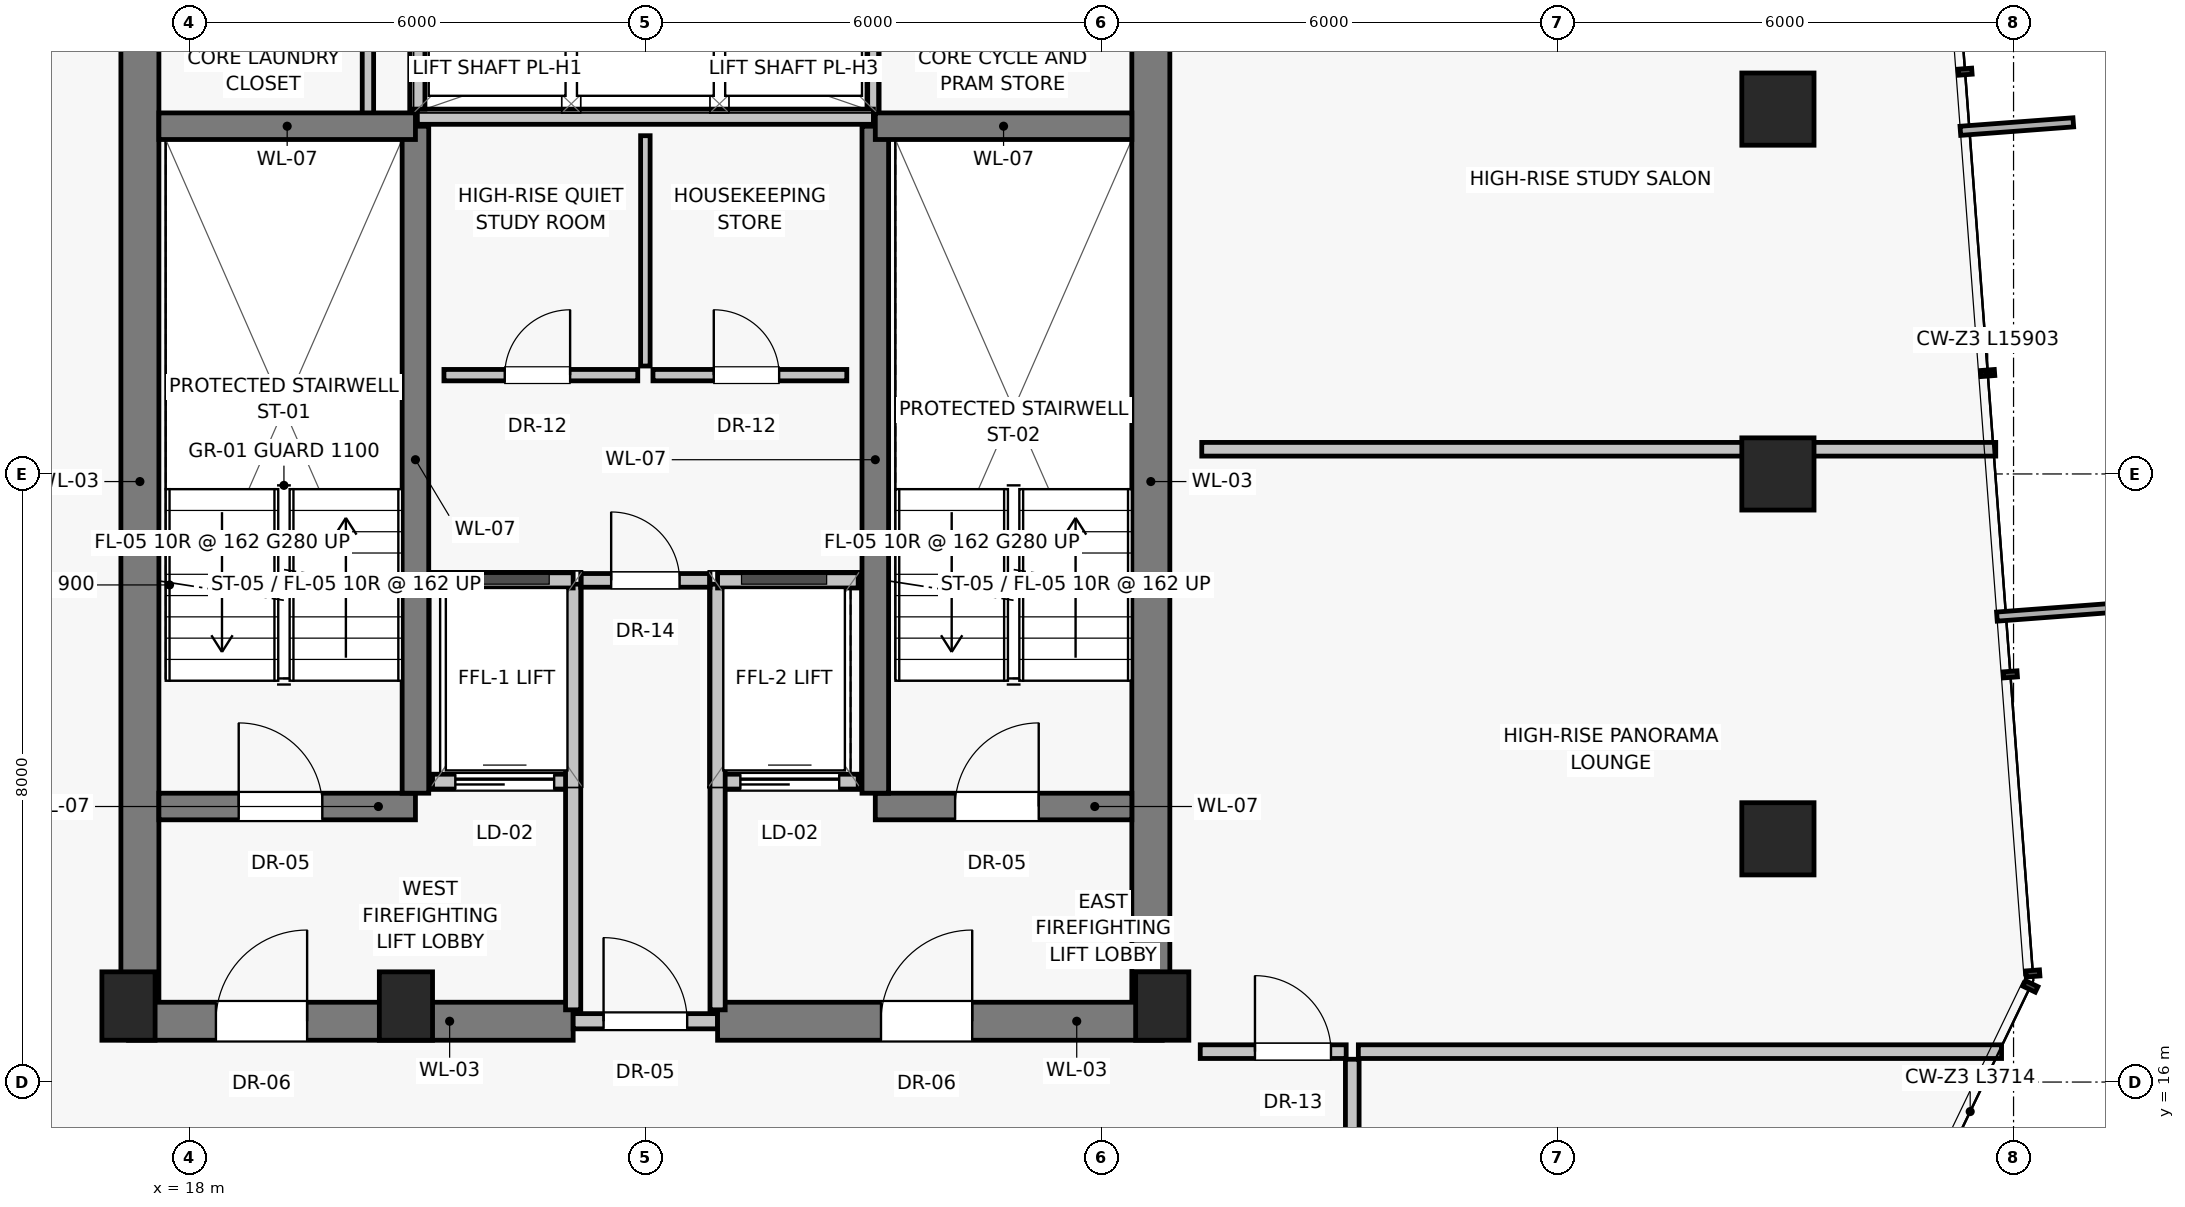
"""IFC4 building model, lengths in metres.
Left out: names, types, materials, properties, quantities, classifications, styles, units other than length and angle.
Written with IfcOpenShell. Run it as: python <this file> out.ifc"""

import sys

from ifc_helpers import new_model, si_unit, direction, frame, frame_2d, origin, origin_2d, place, context, subcontext, project, spatial, rectangle, extrude, source, transform, mapped, element, fill, save


model = new_model("IFC4")
c1 = context("Model", 3, precision=1e-05, world=origin(), true_north=direction((0.0, 1.0)))
c2 = subcontext(c1, "Body", "Model", "MODEL_VIEW")
j1 = project(units=[si_unit("LENGTHUNIT", "METRE"), si_unit("PLANEANGLEUNIT", "RADIAN")], contexts=[c1])
p1 = place(None, origin())
s1 = spatial("IfcSite", under=j1, at=p1, CompositionType="ELEMENT")
p2 = place(p1, origin())
s2 = spatial("IfcBuilding", under=s1, at=p2, CompositionType="ELEMENT")
p3 = place(p2, frame((0.0, 0.0, 191.85)))
s3 = spatial("IfcBuildingStorey", under=s2, at=p3, CompositionType="ELEMENT", Elevation=191.85)
for number, where, z_axis, x_axis in (
    (1, (17.2, 17.0, 0.0), (0.0, 0.0, 1.0), (1.0, 0.0, 0.0)),
    (2, (20.85, 17.0, 0.0), (0.0, 0.0, 1.0), (1.0, 0.0, 0.0)),
    (3, (30.8, 17.0, 0.0), (0.0, 0.0, 1.0), (1.0, 0.0, 0.0)),
):
    element("IfcColumn", number, at=place(p3, frame(where, z_axis=z_axis, x_axis=x_axis)), inside=s3, PredefinedType="PILASTER", context=c2, shape_type="SweptSolid", body=[
        extrude(rectangle(XDim=0.7, YDim=0.9, at=origin_2d()), origin(), (0.0, 0.0, 1.0), 3.25),
    ])
for number, where, z_axis, x_axis in (
    (4, (38.9, 19.2, 0.0), (0.0, 0.0, 1.0), (1.0, 0.0, 0.0)),
    (5, (38.9, 24.0, 0.0), (0.0, 0.0, 1.0), (1.0, 0.0, 0.0)),
    (6, (38.9, 28.8, 0.0), (0.0, 0.0, 1.0), (1.0, 0.0, 0.0)),
):
    element("IfcColumn", number, at=place(p3, frame(where, z_axis=z_axis, x_axis=x_axis)), inside=s3, PredefinedType="COLUMN", context=c2, shape_type="SweptSolid", body=[
        extrude(rectangle(XDim=0.95, YDim=0.95, at=origin_2d()), origin(), (0.0, 0.0, 1.0), 3.25),
    ])
for number, where, z_axis, x_axis in (
    (7, (17.35, 16.8, 0.0), (0.0, 0.0, 1.0), (0.0, 1.0, 0.0)),
    (8, (30.65, 16.8, 0.0), (0.0, 0.0, 1.0), (0.0, 1.0, 0.0)),
):
    element("IfcWall", number, at=place(p3, frame(where, z_axis=z_axis, x_axis=x_axis)), inside=s3, PredefinedType="SHEAR", context=c2, shape_type="SweptSolid", body=[
        extrude(rectangle(XDim=14.2, YDim=0.5, at=frame_2d((7.1, 0.0))), origin(), (0.0, 0.0, 1.0), 3.015),
    ])
p4 = place(p3, frame((17.2, 16.8, 0.0), z_axis=(0.0, 0.0, 1.0), x_axis=(1.0, 0.0, 0.0)))
e9 = element("IfcWall", 9, at=p4, inside=s3, PredefinedType="SHEAR", context=c2, shape_type="SweptSolid", body=[
    extrude(rectangle(XDim=5.85, YDim=0.5, at=frame_2d((2.925, 0.0))), origin(), (0.0, 0.0, 1.0), 3.015),
])
p5 = place(p4, frame((1.15, 0.0, 0.0)))
e10 = element("IfcOpeningElement", 10, at=p5, cuts=e9, PredefinedType="OPENING", context=c2, shape_type="SweptSolid", body=[
    extrude(rectangle(XDim=1.2, YDim=2.03, at=frame_2d((0.6, 1.015))), frame((0.0, 0.26, 0.0), z_axis=(0.0, -1.0, 0.0), x_axis=(1.0, 0.0, 0.0)), (0.0, 0.0, 1.0), 0.52),
])
p6 = place(p3, frame((23.05, 16.8, 0.0), z_axis=(0.0, 0.0, 1.0), x_axis=(1.0, 0.0, 0.0)))
e11 = element("IfcWall", 11, at=p6, inside=s3, PredefinedType="SOLIDWALL", context=c2, shape_type="SweptSolid", body=[
    extrude(rectangle(XDim=1.9, YDim=0.2, at=frame_2d((0.95, 0.0))), origin(), (0.0, 0.0, 1.0), 2.165),
])
p7 = place(p6, frame((0.4, 0.0, 0.0)))
e12 = element("IfcOpeningElement", 12, at=p7, cuts=e11, PredefinedType="OPENING", context=c2, shape_type="SweptSolid", body=[
    extrude(rectangle(XDim=1.1, YDim=2.03, at=frame_2d((0.55, 1.015))), frame((0.0, 0.11, 0.0), z_axis=(0.0, -1.0, 0.0), x_axis=(1.0, 0.0, 0.0)), (0.0, 0.0, 1.0), 0.22),
])
p8 = place(p3, frame((24.95, 16.8, 0.0), z_axis=(0.0, 0.0, 1.0), x_axis=(1.0, 0.0, 0.0)))
e13 = element("IfcWall", 13, at=p8, inside=s3, PredefinedType="SHEAR", context=c2, shape_type="SweptSolid", body=[
    extrude(rectangle(XDim=5.85, YDim=0.5, at=frame_2d((2.925, 0.0))), origin(), (0.0, 0.0, 1.0), 3.015),
])
p9 = place(p8, frame((2.15, 0.0, 0.0)))
e14 = element("IfcOpeningElement", 14, at=p9, cuts=e13, PredefinedType="OPENING", context=c2, shape_type="SweptSolid", body=[
    extrude(rectangle(XDim=1.2, YDim=2.03, at=frame_2d((0.6, 1.015))), frame((0.0, 0.26, 0.0), z_axis=(0.0, -1.0, 0.0), x_axis=(1.0, 0.0, 0.0)), (0.0, 0.0, 1.0), 0.52),
])
for number, where, z_axis, x_axis in (
    (15, (20.35, 28.65, 0.0), (0.0, 0.0, 1.0), (0.0, 1.0, 0.0)),
    (16, (27.0, 28.65, 0.0), (0.0, 0.0, 1.0), (0.0, 1.0, 0.0)),
):
    element("IfcWall", number, at=place(p3, frame(where, z_axis=z_axis, x_axis=x_axis)), inside=s3, PredefinedType="PARTITIONING", context=c2, shape_type="SweptSolid", body=[
        extrude(rectangle(XDim=2.2, YDim=0.15, at=frame_2d((1.1, 0.0))), origin(), (0.0, 0.0, 1.0), 3.015),
    ])
p10 = place(p3, frame((17.6, 19.625, 0.0), z_axis=(0.0, 0.0, 1.0), x_axis=(1.0, 0.0, 0.0)))
e17 = element("IfcWall", 17, at=p10, inside=s3, PredefinedType="SHEAR", context=c2, shape_type="SweptSolid", body=[
    extrude(rectangle(XDim=3.375, YDim=0.35, at=frame_2d((1.688, 0.0))), origin(), (0.0, 0.0, 1.0), 3.015),
])
p11 = place(p10, frame((1.05, 0.0, 0.0)))
e18 = element("IfcOpeningElement", 18, at=p11, cuts=e17, PredefinedType="OPENING", context=c2, shape_type="SweptSolid", body=[
    extrude(rectangle(XDim=1.1, YDim=2.03, at=frame_2d((0.55, 1.015))), frame((0.0, 0.185, 0.0), z_axis=(0.0, -1.0, 0.0), x_axis=(1.0, 0.0, 0.0)), (0.0, 0.0, 1.0), 0.37),
])
p12 = place(p3, frame((21.2, 19.95, 0.0), z_axis=(0.0, 0.0, 1.0), x_axis=(1.0, 0.0, 0.0)))
e19 = element("IfcWall", 19, at=p12, inside=s3, PredefinedType="SOLIDWALL", context=c2, shape_type="SweptSolid", body=[
    extrude(rectangle(XDim=1.85, YDim=0.2, at=frame_2d((0.925, 0.0))), origin(), (0.0, 0.0, 1.0), 3.015),
])
p13 = place(p12, frame((0.3, 0.0, 0.0)))
e20 = element("IfcOpeningElement", 20, at=p13, cuts=e19, PredefinedType="OPENING", context=c2, shape_type="SweptSolid", body=[
    extrude(rectangle(XDim=1.3, YDim=2.25, at=frame_2d((0.65, 1.125))), frame((0.0, 0.11, 0.0), z_axis=(0.0, -1.0, 0.0), x_axis=(1.0, 0.0, 0.0)), (0.0, 0.0, 1.0), 0.22),
])
p14 = place(p3, frame((24.95, 19.95, 0.0), z_axis=(0.0, 0.0, 1.0), x_axis=(1.0, 0.0, 0.0)))
e21 = element("IfcWall", 21, at=p14, inside=s3, PredefinedType="SOLIDWALL", context=c2, shape_type="SweptSolid", body=[
    extrude(rectangle(XDim=1.85, YDim=0.2, at=frame_2d((0.925, 0.0))), origin(), (0.0, 0.0, 1.0), 3.015),
])
p15 = place(p14, frame((0.3, 0.0, 0.0)))
e22 = element("IfcOpeningElement", 22, at=p15, cuts=e21, PredefinedType="OPENING", context=c2, shape_type="SweptSolid", body=[
    extrude(rectangle(XDim=1.3, YDim=2.25, at=frame_2d((0.65, 1.125))), frame((0.0, 0.11, 0.0), z_axis=(0.0, -1.0, 0.0), x_axis=(1.0, 0.0, 0.0)), (0.0, 0.0, 1.0), 0.22),
])
p16 = place(p3, frame((27.025, 19.625, 0.0), z_axis=(0.0, 0.0, 1.0), x_axis=(1.0, 0.0, 0.0)))
e23 = element("IfcWall", 23, at=p16, inside=s3, PredefinedType="SHEAR", context=c2, shape_type="SweptSolid", body=[
    extrude(rectangle(XDim=3.375, YDim=0.35, at=frame_2d((1.688, 0.0))), origin(), (0.0, 0.0, 1.0), 3.015),
])
p17 = place(p16, frame((1.05, 0.0, 0.0)))
e24 = element("IfcOpeningElement", 24, at=p17, cuts=e23, PredefinedType="OPENING", context=c2, shape_type="SweptSolid", body=[
    extrude(rectangle(XDim=1.1, YDim=2.03, at=frame_2d((0.55, 1.015))), frame((0.0, 0.185, 0.0), z_axis=(0.0, -1.0, 0.0), x_axis=(1.0, 0.0, 0.0)), (0.0, 0.0, 1.0), 0.37),
])
for number, where, z_axis, x_axis in (
    (25, (20.975, 19.8, 0.0), (0.0, 0.0, 1.0), (0.0, 1.0, 0.0)),
    (26, (27.025, 19.8, 0.0), (0.0, 0.0, 1.0), (0.0, 1.0, 0.0)),
):
    element("IfcWall", number, at=place(p3, frame(where, z_axis=z_axis, x_axis=x_axis)), inside=s3, PredefinedType="SHEAR", context=c2, shape_type="SweptSolid", body=[
        extrude(rectangle(XDim=8.775, YDim=0.35, at=frame_2d((4.387, 0.0))), origin(), (0.0, 0.0, 1.0), 3.015),
    ])
for number, where, z_axis, x_axis in (
    (27, (17.6, 28.575, 0.0), (0.0, 0.0, 1.0), (1.0, 0.0, 0.0)),
    (28, (27.025, 28.575, 0.0), (0.0, 0.0, 1.0), (1.0, 0.0, 0.0)),
):
    element("IfcWall", number, at=place(p3, frame(where, z_axis=z_axis, x_axis=x_axis)), inside=s3, PredefinedType="SHEAR", context=c2, shape_type="SweptSolid", body=[
        extrude(rectangle(XDim=3.375, YDim=0.35, at=frame_2d((1.688, 0.0))), origin(), (0.0, 0.0, 1.0), 3.015),
    ])
for number, where, z_axis, x_axis in (
    (29, (23.05, 16.95, 0.0), (0.0, 0.0, 1.0), (0.0, 1.0, 0.0)),
    (30, (24.95, 16.95, 0.0), (0.0, 0.0, 1.0), (0.0, 1.0, 0.0)),
):
    element("IfcWall", number, at=place(p3, frame(where, z_axis=z_axis, x_axis=x_axis)), inside=s3, PredefinedType="SOLIDWALL", context=c2, shape_type="SweptSolid", body=[
        extrude(rectangle(XDim=5.6, YDim=0.2, at=frame_2d((2.8, 0.0))), origin(), (0.0, 0.0, 1.0), 3.015),
    ])
for number, where, z_axis, x_axis in (
    (31, (21.2, 22.6, 0.0), (0.0, 0.0, 1.0), (1.0, 0.0, 0.0)),
    (32, (24.95, 22.6, 0.0), (0.0, 0.0, 1.0), (1.0, 0.0, 0.0)),
):
    element("IfcWall", number, at=place(p3, frame(where, z_axis=z_axis, x_axis=x_axis)), inside=s3, PredefinedType="SOLIDWALL", context=c2, shape_type="SweptSolid", body=[
        extrude(rectangle(XDim=1.85, YDim=0.2, at=frame_2d((0.925, 0.0))), origin(), (0.0, 0.0, 1.0), 3.015),
    ])
p18 = place(p3, frame((21.0, 28.7, 0.0), z_axis=(0.0, 0.0, 1.0), x_axis=(1.0, 0.0, 0.0)))
e33 = element("IfcWall", 33, at=p18, inside=s3, PredefinedType="SOLIDWALL", context=c2, shape_type="SweptSolid", body=[
    extrude(rectangle(XDim=6.0, YDim=0.2, at=frame_2d((3.0, 0.0))), origin(), (0.0, 0.0, 1.0), 3.015),
])
p19 = place(p3, frame((21.0, 28.8, 0.0), z_axis=(0.0, 0.0, 1.0), x_axis=(0.0, 1.0, 0.0)))
e34 = element("IfcWall", 34, at=p19, inside=s3, PredefinedType="SOLIDWALL", context=c2, shape_type="SweptSolid", body=[
    extrude(rectangle(XDim=1.6, YDim=0.2, at=frame_2d((0.8, 0.0))), origin(), (0.0, 0.0, 1.0), 3.015),
])
p20 = place(p3, frame((23.15, 22.6, 0.0), z_axis=(0.0, 0.0, 1.0), x_axis=(1.0, 0.0, 0.0)))
e35 = element("IfcWall", 35, at=p20, inside=s3, PredefinedType="PARTITIONING", context=c2, shape_type="SweptSolid", body=[
    extrude(rectangle(XDim=1.7, YDim=0.18, at=frame_2d((0.85, 0.0))), origin(), (0.0, 0.0, 1.0), 3.015),
])
p21 = place(p20, frame((0.4, 0.0, 0.0)))
e36 = element("IfcOpeningElement", 36, at=p21, cuts=e35, PredefinedType="OPENING", context=c2, shape_type="SweptSolid", body=[
    extrude(rectangle(XDim=0.9, YDim=2.01, at=frame_2d((0.45, 1.005))), frame((0.0, 0.1, 0.0), z_axis=(0.0, -1.0, 0.0), x_axis=(1.0, 0.0, 0.0)), (0.0, 0.0, 1.0), 0.2),
])
p22 = place(p3, frame((21.35, 25.3, 0.0), z_axis=(0.0, 0.0, 1.0), x_axis=(1.0, 0.0, 0.0)))
e37 = element("IfcWall", 37, at=p22, inside=s3, PredefinedType="PARTITIONING", context=c2, shape_type="SweptSolid", body=[
    extrude(rectangle(XDim=2.55, YDim=0.15, at=frame_2d((1.275, 0.0))), origin(), (0.0, 0.0, 1.0), 3.015),
])
p23 = place(p22, frame((0.8, 0.0, 0.0)))
e38 = element("IfcOpeningElement", 38, at=p23, cuts=e37, PredefinedType="OPENING", context=c2, shape_type="SweptSolid", body=[
    extrude(rectangle(XDim=0.86, YDim=2.01, at=frame_2d((0.43, 1.005))), frame((0.0, 0.085, 0.0), z_axis=(0.0, -1.0, 0.0), x_axis=(1.0, 0.0, 0.0)), (0.0, 0.0, 1.0), 0.17),
])
p24 = place(p3, frame((24.1, 25.3, 0.0), z_axis=(0.0, 0.0, 1.0), x_axis=(1.0, 0.0, 0.0)))
e39 = element("IfcWall", 39, at=p24, inside=s3, PredefinedType="PARTITIONING", context=c2, shape_type="SweptSolid", body=[
    extrude(rectangle(XDim=2.55, YDim=0.15, at=frame_2d((1.275, 0.0))), origin(), (0.0, 0.0, 1.0), 3.015),
])
p25 = place(p24, frame((0.8, 0.0, 0.0)))
e40 = element("IfcOpeningElement", 40, at=p25, cuts=e39, PredefinedType="OPENING", context=c2, shape_type="SweptSolid", body=[
    extrude(rectangle(XDim=0.86, YDim=2.01, at=frame_2d((0.43, 1.005))), frame((0.0, 0.085, 0.0), z_axis=(0.0, -1.0, 0.0), x_axis=(1.0, 0.0, 0.0)), (0.0, 0.0, 1.0), 0.17),
])
p26 = place(p3, frame((24.0, 25.42, 0.0), z_axis=(0.0, 0.0, 1.0), x_axis=(0.0, 1.0, 0.0)))
e41 = element("IfcWall", 41, at=p26, inside=s3, PredefinedType="PARTITIONING", context=c2, shape_type="SweptSolid", body=[
    extrude(rectangle(XDim=3.03, YDim=0.125, at=frame_2d((1.515, 0.0))), origin(), (0.0, 0.0, 1.0), 3.015),
])
p27 = place(p3, frame((31.32, 24.325, 0.0), z_axis=(0.0, 0.0, 1.0), x_axis=(1.0, 0.0, 0.0)))
e42 = element("IfcWall", 42, at=p27, inside=s3, PredefinedType="PARTITIONING", context=c2, shape_type="SweptSolid", body=[
    extrude(rectangle(XDim=10.446, YDim=0.18, at=frame_2d((5.223, 0.0))), origin(), (0.0, 0.0, 1.0), 3.015),
])
p28 = place(p3, frame((33.3, 14.4, 0.0), z_axis=(0.0, 0.0, 1.0), x_axis=(0.0, 1.0, 0.0)))
e43 = element("IfcWall", 43, at=p28, inside=s3, PredefinedType="PARTITIONING", context=c2, shape_type="SweptSolid", body=[
    extrude(rectangle(XDim=1.9, YDim=0.18, at=frame_2d((0.95, 0.0))), origin(), (0.0, 0.0, 1.0), 3.015),
])
p29 = place(p3, frame((31.3, 16.4, 0.0), z_axis=(0.0, 0.0, 1.0), x_axis=(1.0, 0.0, 0.0)))
e44 = element("IfcWall", 44, at=p29, inside=s3, PredefinedType="PARTITIONING", context=c2, shape_type="SweptSolid", body=[
    extrude(rectangle(XDim=1.92, YDim=0.18, at=frame_2d((0.96, 0.0))), origin(), (0.0, 0.0, 1.0), 3.015),
])
p30 = place(p29, frame((0.72, 0.0, 0.0)))
e45 = element("IfcOpeningElement", 45, at=p30, cuts=e44, PredefinedType="OPENING", context=c2, shape_type="SweptSolid", body=[
    extrude(rectangle(XDim=1.0, YDim=2.01, at=frame_2d((0.5, 1.005))), frame((0.0, 0.1, 0.0), z_axis=(0.0, -1.0, 0.0), x_axis=(1.0, 0.0, 0.0)), (0.0, 0.0, 1.0), 0.2),
])
p31 = place(p3, frame((33.38, 16.4, 0.0), z_axis=(0.0, 0.0, 1.0), x_axis=(1.0, 0.0, 0.0)))
e46 = element("IfcWall", 46, at=p31, inside=s3, PredefinedType="PARTITIONING", context=c2, shape_type="SweptSolid", body=[
    extrude(rectangle(XDim=8.462, YDim=0.18, at=frame_2d((4.231, 0.0))), origin(), (0.0, 0.0, 1.0), 3.015),
])
m1 = source(origin(), c2, "Body", "SweptSolid", [
    extrude(rectangle(XDim=1.2, YDim=2.03, at=frame_2d((0.6, 1.015))), frame((0.0, 0.025, 0.0), z_axis=(0.0, -1.0, 0.0), x_axis=(1.0, 0.0, 0.0)), (0.0, 0.0, 1.0), 0.05),
])
p32 = place(p5, origin())
e47 = element("IfcDoor", 47, at=p32, inside=s3, OperationType="SINGLE_SWING_RIGHT", PredefinedType="DOOR", context=c2, shape_type="MappedRepresentation", body=[
    mapped(m1, transform((0.0, 0.0, 0.0), scale=1.0)),
])
fill(e10, e47)
m2 = source(origin(), c2, "Body", "SweptSolid", [
    extrude(rectangle(XDim=1.1, YDim=2.03, at=frame_2d((0.55, 1.015))), frame((0.0, 0.025, 0.0), z_axis=(0.0, -1.0, 0.0), x_axis=(1.0, 0.0, 0.0)), (0.0, 0.0, 1.0), 0.05),
])
p33 = place(p7, origin())
e48 = element("IfcDoor", 48, at=p33, inside=s3, OperationType="SINGLE_SWING_LEFT", PredefinedType="DOOR", context=c2, shape_type="MappedRepresentation", body=[
    mapped(m2, transform((0.0, 0.0, 0.0), scale=1.0)),
])
fill(e12, e48)
p34 = place(p9, origin())
e49 = element("IfcDoor", 49, at=p34, inside=s3, OperationType="SINGLE_SWING_RIGHT", PredefinedType="DOOR", context=c2, shape_type="MappedRepresentation", body=[
    mapped(m1, transform((0.0, 0.0, 0.0), scale=1.0)),
])
fill(e14, e49)
p35 = place(p11, origin())
e50 = element("IfcDoor", 50, at=p35, inside=s3, OperationType="SINGLE_SWING_LEFT", PredefinedType="DOOR", context=c2, shape_type="MappedRepresentation", body=[
    mapped(m2, transform((0.0, 0.0, 0.0), scale=1.0)),
])
fill(e18, e50)
m3 = source(origin(), c2, "Body", "SweptSolid", [
    extrude(rectangle(XDim=1.3, YDim=2.25, at=frame_2d((0.65, 1.125))), frame((0.0, 0.025, 0.0), z_axis=(0.0, -1.0, 0.0), x_axis=(1.0, 0.0, 0.0)), (0.0, 0.0, 1.0), 0.05),
])
p36 = place(p13, origin())
e51 = element("IfcDoor", 51, at=p36, inside=s3, OperationType="SLIDING_TO_LEFT", PredefinedType="DOOR", context=c2, shape_type="MappedRepresentation", body=[
    mapped(m3, transform((0.0, 0.0, 0.0), scale=1.0)),
])
fill(e20, e51)
p37 = place(p15, origin())
e52 = element("IfcDoor", 52, at=p37, inside=s3, OperationType="SLIDING_TO_LEFT", PredefinedType="DOOR", context=c2, shape_type="MappedRepresentation", body=[
    mapped(m3, transform((0.0, 0.0, 0.0), scale=1.0)),
])
fill(e22, e52)
p38 = place(p17, origin())
e53 = element("IfcDoor", 53, at=p38, inside=s3, OperationType="SINGLE_SWING_RIGHT", PredefinedType="DOOR", context=c2, shape_type="MappedRepresentation", body=[
    mapped(m2, transform((0.0, 0.0, 0.0), scale=1.0)),
])
fill(e24, e53)
m4 = source(origin(), c2, "Body", "SweptSolid", [
    extrude(rectangle(XDim=0.9, YDim=2.01, at=frame_2d((0.45, 1.005))), frame((0.0, 0.025, 0.0), z_axis=(0.0, -1.0, 0.0), x_axis=(1.0, 0.0, 0.0)), (0.0, 0.0, 1.0), 0.05),
])
p39 = place(p21, origin())
e54 = element("IfcDoor", 54, at=p39, inside=s3, OperationType="SINGLE_SWING_LEFT", PredefinedType="DOOR", context=c2, shape_type="MappedRepresentation", body=[
    mapped(m4, transform((0.0, 0.0, 0.0), scale=1.0)),
])
fill(e36, e54)
m5 = source(origin(), c2, "Body", "SweptSolid", [
    extrude(rectangle(XDim=0.86, YDim=2.01, at=frame_2d((0.43, 1.005))), frame((0.0, 0.025, 0.0), z_axis=(0.0, -1.0, 0.0), x_axis=(1.0, 0.0, 0.0)), (0.0, 0.0, 1.0), 0.05),
])
p40 = place(p23, origin())
e55 = element("IfcDoor", 55, at=p40, inside=s3, OperationType="SINGLE_SWING_RIGHT", PredefinedType="DOOR", context=c2, shape_type="MappedRepresentation", body=[
    mapped(m5, transform((0.0, 0.0, 0.0), scale=1.0)),
])
fill(e38, e55)
p41 = place(p25, origin())
e56 = element("IfcDoor", 56, at=p41, inside=s3, OperationType="SINGLE_SWING_LEFT", PredefinedType="DOOR", context=c2, shape_type="MappedRepresentation", body=[
    mapped(m5, transform((0.0, 0.0, 0.0), scale=1.0)),
])
fill(e40, e56)
m6 = source(origin(), c2, "Body", "SweptSolid", [
    extrude(rectangle(XDim=1.0, YDim=2.01, at=frame_2d((0.5, 1.005))), frame((0.0, 0.025, 0.0), z_axis=(0.0, -1.0, 0.0), x_axis=(1.0, 0.0, 0.0)), (0.0, 0.0, 1.0), 0.05),
])
p42 = place(p30, origin())
e57 = element("IfcDoor", 57, at=p42, inside=s3, OperationType="SINGLE_SWING_LEFT", PredefinedType="DOOR", context=c2, shape_type="MappedRepresentation", body=[
    mapped(m6, transform((0.0, 0.0, 0.0), scale=1.0)),
])
fill(e45, e57)
save(model, sys.argv[1])
